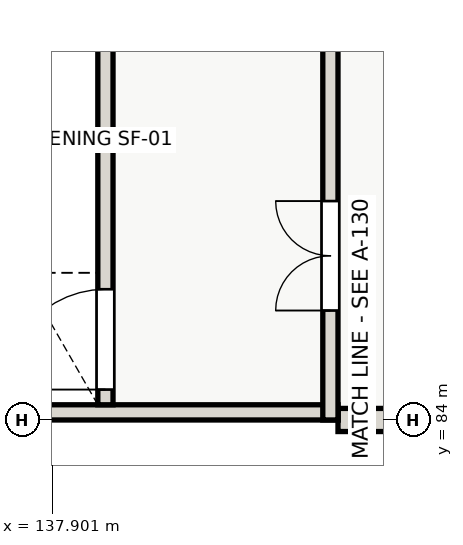
"""IFC4 building model, lengths in metres.
Left out: names, types, materials, properties, quantities, classifications, styles, units other than length and angle.
Written with IfcOpenShell. Run it as: python <this file> out.ifc"""

import sys

from ifc_helpers import new_model, si_unit, direction, frame, frame_2d, origin, place, context, subcontext, project, spatial, rectangle, extrude, element, fill, save


model = new_model("IFC4")
c1 = context("Model", 3, precision=1e-05, world=origin(), true_north=direction((0.0, 1.0)))
c2 = subcontext(c1, "Body", "Model", "MODEL_VIEW")
j1 = project(units=[si_unit("LENGTHUNIT", "METRE"), si_unit("PLANEANGLEUNIT", "RADIAN")], contexts=[c1])
p1 = place(None, origin())
s1 = spatial("IfcSite", under=j1, at=p1, CompositionType="ELEMENT")
p2 = place(p1, origin())
s2 = spatial("IfcBuilding", under=s1, at=p2, CompositionType="ELEMENT")
p3 = place(p2, frame((0.0, 0.0, 8.4)))
s3 = spatial("IfcBuildingStorey", under=s2, at=p3, CompositionType="ELEMENT", Elevation=8.4)
p4 = place(p3, frame((144.0, 84.0, 0.0), z_axis=(0.0, 0.0, 1.0), x_axis=(-1.0, 0.0, 0.0)))
e1 = element("IfcWall", 1, at=p4, inside=s3, PredefinedType="SOLIDWALL", context=c2, shape_type="SweptSolid", body=[
    extrude(rectangle(XDim=1.4, YDim=0.38, at=frame_2d((0.7, 0.0))), origin(), (0.0, 0.0, 1.0), 3.69),
])
p5 = place(p3, frame((142.6, 84.125, 0.0), z_axis=(0.0, 0.0, 1.0), x_axis=(-1.0, 0.0, 0.0)))
e2 = element("IfcWall", 2, at=p5, inside=s3, PredefinedType="SHEAR", context=c2, shape_type="SweptSolid", body=[
    extrude(rectangle(XDim=9.2, YDim=0.25, at=frame_2d((4.6, 0.0))), origin(), (0.0, 0.0, 1.0), 4.2),
])
p6 = place(p3, frame((142.475, 84.0, 0.0), z_axis=(0.0, 0.0, 1.0), x_axis=(0.0, 1.0, 0.0)))
e3 = element("IfcWall", 3, at=p6, inside=s3, PredefinedType="SHEAR", context=c2, shape_type="SweptSolid", body=[
    extrude(rectangle(XDim=9.2, YDim=0.25, at=frame_2d((4.6, 0.0))), origin(), (0.0, 0.0, 1.0), 4.2),
])
p7 = place(p6, frame((1.8, 0.0, 0.0)))
e4 = element("IfcOpeningElement", 4, at=p7, cuts=e3, PredefinedType="OPENING", context=c2, shape_type="SweptSolid", body=[
    extrude(rectangle(XDim=1.8, YDim=2.15, at=frame_2d((0.9, 1.075))), frame((0.0, 0.135, 0.0), z_axis=(0.0, -1.0, 0.0), x_axis=(1.0, 0.0, 0.0)), (0.0, 0.0, 1.0), 0.27),
])
p8 = place(p3, frame((138.775, 84.25, 0.0), z_axis=(0.0, 0.0, 1.0), x_axis=(0.0, 1.0, 0.0)))
e5 = element("IfcWall", 5, at=p8, inside=s3, PredefinedType="SHEAR", context=c2, shape_type="SweptSolid", body=[
    extrude(rectangle(XDim=8.7, YDim=0.25, at=frame_2d((4.35, 0.0))), origin(), (0.0, 0.0, 1.0), 4.2),
])
p9 = place(p8, frame((0.25, 0.0, 0.0)))
e6 = element("IfcOpeningElement", 6, at=p9, cuts=e5, PredefinedType="OPENING", context=c2, shape_type="SweptSolid", body=[
    extrude(rectangle(XDim=1.65, YDim=2.1, at=frame_2d((0.825, 1.05))), frame((0.0, 0.135, 0.0), z_axis=(0.0, -1.0, 0.0), x_axis=(1.0, 0.0, 0.0)), (0.0, 0.0, 1.0), 0.27),
])
p10 = place(p7, origin())
e7 = element("IfcDoor", 7, at=p10, inside=s3, OperationType="DOUBLE_DOOR_SINGLE_SWING", PredefinedType="DOOR", context=c2, shape_type="SweptSolid", body=[
    extrude(rectangle(XDim=1.8, YDim=2.15, at=frame_2d((0.9, 1.075))), frame((0.0, 0.025, 0.0), z_axis=(0.0, -1.0, 0.0), x_axis=(1.0, 0.0, 0.0)), (0.0, 0.0, 1.0), 0.05),
])
fill(e4, e7)
p11 = place(p9, origin())
e8 = element("IfcDoor", 8, at=p11, inside=s3, OperationType="SINGLE_SWING_LEFT", PredefinedType="DOOR", context=c2, shape_type="SweptSolid", body=[
    extrude(rectangle(XDim=1.65, YDim=2.1, at=frame_2d((0.825, 1.05))), frame((0.0, 0.025, 0.0), z_axis=(0.0, -1.0, 0.0), x_axis=(1.0, 0.0, 0.0)), (0.0, 0.0, 1.0), 0.05),
])
fill(e6, e8)
save(model, sys.argv[1])
